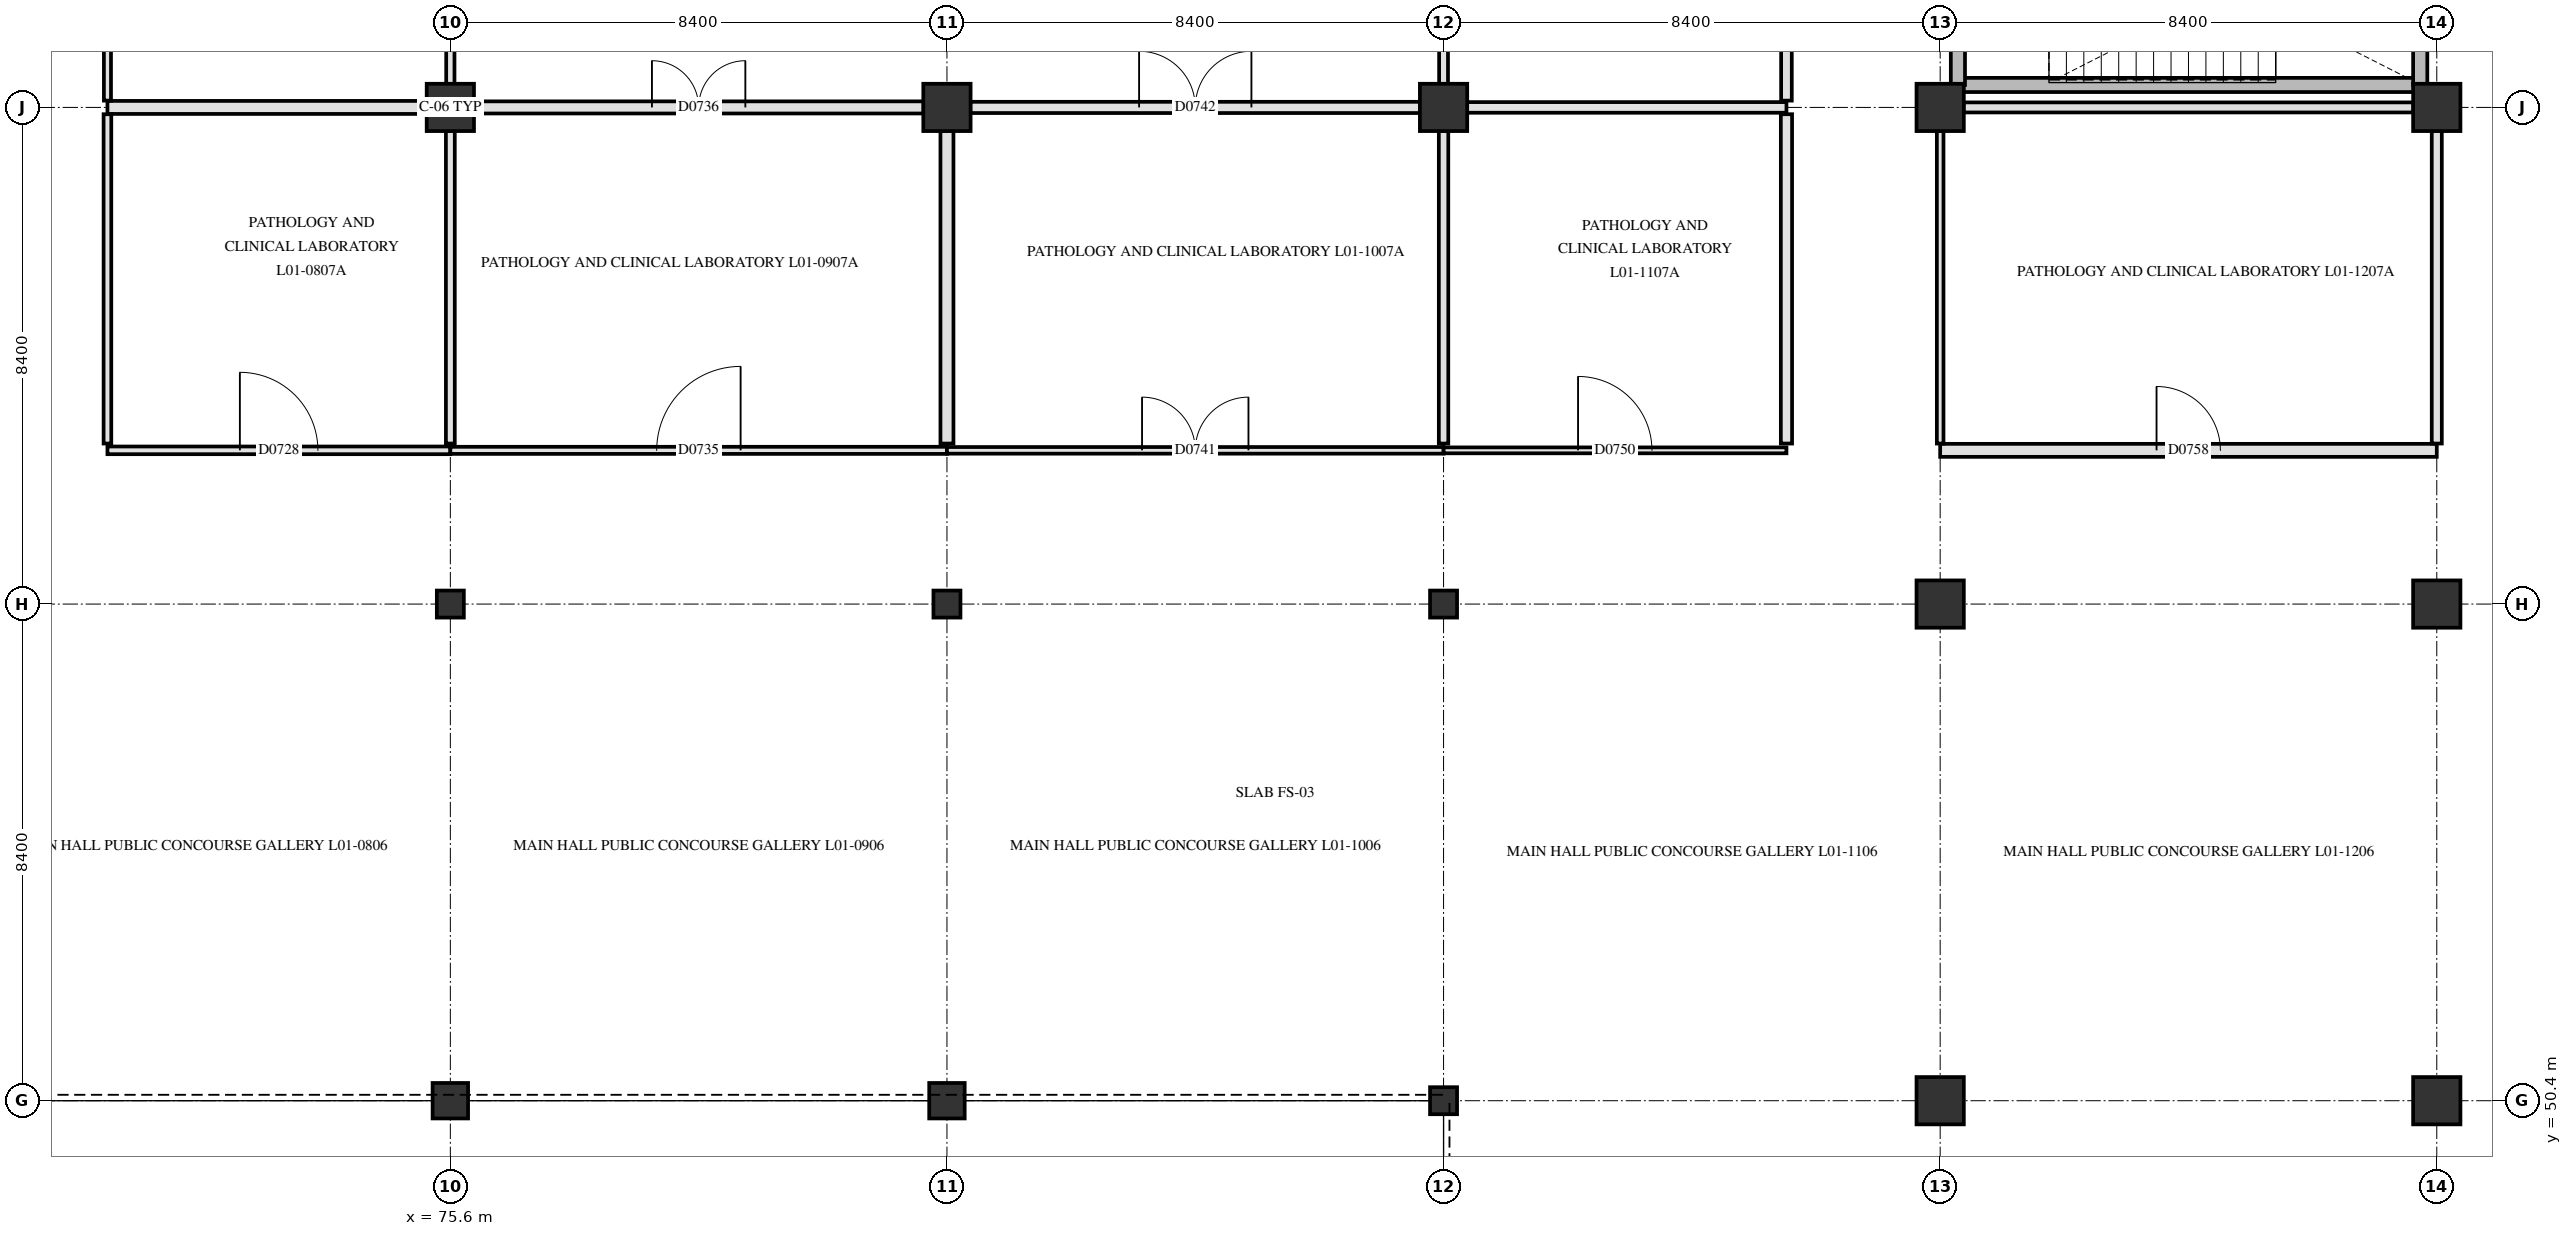
"""IFC4 building model, lengths in metres.
Left out: names, types, materials, properties, quantities, classifications, styles, units other than length and angle.
Written with IfcOpenShell. Run it as: python <this file> out.ifc"""

import sys

from ifc_helpers import new_model, si_unit, direction, frame, frame_2d, origin, origin_2d, place, context, subcontext, project, spatial, rectangle, circle, hollow_circle, extrude, element, fill, save


model = new_model("IFC4")
c1 = context("Model", 3, precision=1e-05, world=origin(), true_north=direction((0.0, 1.0)))
c2 = subcontext(c1, "Body", "Model", "MODEL_VIEW")
j1 = project(units=[si_unit("LENGTHUNIT", "METRE"), si_unit("PLANEANGLEUNIT", "RADIAN")], contexts=[c1])
p1 = place(None, origin())
s1 = spatial("IfcSite", under=j1, at=p1, CompositionType="ELEMENT")
p2 = place(p1, origin())
s2 = spatial("IfcBuilding", under=s1, at=p2, CompositionType="ELEMENT")
p3 = place(p2, frame((0.0, 0.0, 4.8)))
s3 = spatial("IfcBuildingStorey", under=s2, at=p3, CompositionType="ELEMENT", Elevation=4.8)
p4 = place(p3, frame((75.6, 50.4, 0.0), z_axis=(0.0, 0.0, 1.0), x_axis=(1.0, 0.0, 0.0)))
e1 = element("IfcColumn", 1, at=p4, inside=s3, PredefinedType="COLUMN", context=c2, shape_type="SweptSolid", body=[
    extrude(rectangle(XDim=0.6, YDim=0.6, at=origin_2d()), origin(), (0.0, 0.0, 1.0), 4.5),
])
p5 = place(p3, frame((75.6, 58.8, 0.0), z_axis=(0.0, 0.0, 1.0), x_axis=(1.0, 0.0, 0.0)))
e2 = element("IfcColumn", 2, at=p5, inside=s3, PredefinedType="COLUMN", context=c2, shape_type="SweptSolid", body=[
    extrude(hollow_circle(Radius=0.229, WallThickness=0.02, at=origin_2d()), origin(), (0.0, 0.0, 1.0), 4.5),
])
p6 = place(p3, frame((75.6, 67.2, 0.0), z_axis=(0.0, 0.0, 1.0), x_axis=(1.0, 0.0, 0.0)))
e3 = element("IfcColumn", 3, at=p6, inside=s3, PredefinedType="COLUMN", context=c2, shape_type="SweptSolid", body=[
    extrude(circle(Radius=0.4, at=origin_2d()), origin(), (0.0, 0.0, 1.0), 4.5),
])
p7 = place(p3, frame((84.0, 50.4, 0.0), z_axis=(0.0, 0.0, 1.0), x_axis=(1.0, 0.0, 0.0)))
e4 = element("IfcColumn", 4, at=p7, inside=s3, PredefinedType="COLUMN", context=c2, shape_type="SweptSolid", body=[
    extrude(rectangle(XDim=0.6, YDim=0.6, at=origin_2d()), origin(), (0.0, 0.0, 1.0), 4.5),
])
p8 = place(p3, frame((84.0, 58.8, 0.0), z_axis=(0.0, 0.0, 1.0), x_axis=(1.0, 0.0, 0.0)))
e5 = element("IfcColumn", 5, at=p8, inside=s3, PredefinedType="COLUMN", context=c2, shape_type="SweptSolid", body=[
    extrude(hollow_circle(Radius=0.229, WallThickness=0.02, at=origin_2d()), origin(), (0.0, 0.0, 1.0), 4.5),
])
p9 = place(p3, frame((84.0, 67.2, 0.0), z_axis=(0.0, 0.0, 1.0), x_axis=(1.0, 0.0, 0.0)))
e6 = element("IfcColumn", 6, at=p9, inside=s3, PredefinedType="COLUMN", context=c2, shape_type="SweptSolid", body=[
    extrude(circle(Radius=0.4, at=origin_2d()), origin(), (0.0, 0.0, 1.0), 4.5),
])
for number, where, z_axis, x_axis in (
    (7, (92.4, 50.4, 0.0), (0.0, 0.0, 1.0), (1.0, 0.0, 0.0)),
    (8, (92.4, 58.8, 0.0), (0.0, 0.0, 1.0), (1.0, 0.0, 0.0)),
):
    element("IfcColumn", number, at=place(p3, frame(where, z_axis=z_axis, x_axis=x_axis)), inside=s3, PredefinedType="COLUMN", context=c2, shape_type="SweptSolid", body=[
        extrude(hollow_circle(Radius=0.229, WallThickness=0.02, at=origin_2d()), origin(), (0.0, 0.0, 1.0), 4.5),
    ])
p10 = place(p3, frame((92.4, 67.2, 0.0), z_axis=(0.0, 0.0, 1.0), x_axis=(1.0, 0.0, 0.0)))
e9 = element("IfcColumn", 9, at=p10, inside=s3, PredefinedType="COLUMN", context=c2, shape_type="SweptSolid", body=[
    extrude(circle(Radius=0.4, at=origin_2d()), origin(), (0.0, 0.0, 1.0), 4.5),
])
for number, where, z_axis, x_axis in (
    (10, (100.8, 50.4, 0.0), (0.0, 0.0, 1.0), (1.0, 0.0, 0.0)),
    (11, (100.8, 58.8, 0.0), (0.0, 0.0, 1.0), (1.0, 0.0, 0.0)),
    (12, (100.8, 67.2, 0.0), (0.0, 0.0, 1.0), (1.0, 0.0, 0.0)),
    (13, (109.2, 50.4, 0.0), (0.0, 0.0, 1.0), (1.0, 0.0, 0.0)),
):
    element("IfcColumn", number, at=place(p3, frame(where, z_axis=z_axis, x_axis=x_axis)), inside=s3, PredefinedType="COLUMN", context=c2, shape_type="SweptSolid", body=[
        extrude(rectangle(XDim=0.8, YDim=0.8, at=origin_2d()), origin(), (0.0, 0.0, 1.0), 4.5),
    ])
for number, where, z_axis, x_axis in (
    (14, (109.2, 58.8, 0.0), (0.0, 0.0, 1.0), (1.0, 0.0, 0.0)),
    (15, (109.2, 67.2, 0.0), (0.0, 0.0, 1.0), (1.0, 0.0, 0.0)),
):
    element("IfcColumn", number, at=place(p3, frame(where, z_axis=z_axis, x_axis=x_axis)), inside=s3, PredefinedType="COLUMN", context=c2, shape_type="SweptSolid", body=[
        extrude(circle(Radius=0.4, at=origin_2d()), origin(), (0.0, 0.0, 1.0), 4.5),
    ])
p11 = place(p3, frame((101.1, 67.58, 0.0), z_axis=(0.0, 0.0, 1.0), x_axis=(1.0, 0.0, 0.0)))
e16 = element("IfcWall", 16, at=p11, inside=s3, PredefinedType="SHEAR", context=c2, shape_type="SweptSolid", body=[
    extrude(rectangle(XDim=7.82, YDim=0.24, at=frame_2d((3.91, 0.0))), origin(), (0.0, 0.0, 1.0), 4.15),
])
for number, where, z_axis, x_axis in (
    (17, (101.1, 67.58, 0.0), (0.0, 0.0, 1.0), (0.0, 1.0, 0.0)),
    (18, (108.92, 67.58, 0.0), (0.0, 0.0, 1.0), (0.0, 1.0, 0.0)),
):
    element("IfcWall", number, at=place(p3, frame(where, z_axis=z_axis, x_axis=x_axis)), inside=s3, PredefinedType="SHEAR", context=c2, shape_type="SweptSolid", body=[
        extrude(rectangle(XDim=3.32, YDim=0.24, at=frame_2d((1.66, 0.0))), origin(), (0.0, 0.0, 1.0), 4.15),
    ])
p12 = place(p3, frame((69.8, 61.4, 0.0), z_axis=(0.0, 0.0, 1.0), x_axis=(1.0, 0.0, 0.0)))
e19 = element("IfcWall", 19, at=p12, inside=s3, PredefinedType="PARTITIONING", context=c2, shape_type="SweptSolid", body=[
    extrude(rectangle(XDim=5.8, YDim=0.13, at=frame_2d((2.9, 0.0))), origin(), (0.0, 0.0, 1.0), 3.59),
])
p13 = place(p12, frame((2.24, 0.0, 0.0)))
e20 = element("IfcOpeningElement", 20, at=p13, cuts=e19, PredefinedType="OPENING", context=c2, shape_type="SweptSolid", body=[
    extrude(rectangle(XDim=1.32, YDim=2.18, at=frame_2d((0.66, 1.09))), frame((0.0, 0.075, 0.0), z_axis=(0.0, -1.0, 0.0), x_axis=(1.0, 0.0, 0.0)), (0.0, 0.0, 1.0), 0.15),
])
p14 = place(p3, frame((75.6, 61.4, 0.0), z_axis=(0.0, 0.0, 1.0), x_axis=(1.0, 0.0, 0.0)))
e21 = element("IfcWall", 21, at=p14, inside=s3, PredefinedType="PARTITIONING", context=c2, shape_type="SweptSolid", body=[
    extrude(rectangle(XDim=8.4, YDim=0.12, at=frame_2d((4.2, 0.0))), origin(), (0.0, 0.0, 1.0), 3.59),
])
p15 = place(p14, frame((3.49, 0.0, 0.0)))
e22 = element("IfcOpeningElement", 22, at=p15, cuts=e21, PredefinedType="OPENING", context=c2, shape_type="SweptSolid", body=[
    extrude(rectangle(XDim=1.42, YDim=2.22, at=frame_2d((0.71, 1.11))), frame((0.0, 0.07, 0.0), z_axis=(0.0, -1.0, 0.0), x_axis=(1.0, 0.0, 0.0)), (0.0, 0.0, 1.0), 0.14),
])
p16 = place(p3, frame((84.0, 61.4, 0.0), z_axis=(0.0, 0.0, 1.0), x_axis=(1.0, 0.0, 0.0)))
e23 = element("IfcWall", 23, at=p16, inside=s3, PredefinedType="PARTITIONING", context=c2, shape_type="SweptSolid", body=[
    extrude(rectangle(XDim=8.4, YDim=0.112, at=frame_2d((4.2, 0.0))), origin(), (0.0, 0.0, 1.0), 3.59),
])
p17 = place(p16, frame((3.3, 0.0, 0.0)))
e24 = element("IfcOpeningElement", 24, at=p17, cuts=e23, PredefinedType="OPENING", context=c2, shape_type="SweptSolid", body=[
    extrude(rectangle(XDim=1.8, YDim=2.25, at=frame_2d((0.9, 1.125))), frame((0.0, 0.066, 0.0), z_axis=(0.0, -1.0, 0.0), x_axis=(1.0, 0.0, 0.0)), (0.0, 0.0, 1.0), 0.132),
])
p18 = place(p3, frame((92.4, 61.4, 0.0), z_axis=(0.0, 0.0, 1.0), x_axis=(1.0, 0.0, 0.0)))
e25 = element("IfcWall", 25, at=p18, inside=s3, PredefinedType="PARTITIONING", context=c2, shape_type="SweptSolid", body=[
    extrude(rectangle(XDim=5.8, YDim=0.1, at=frame_2d((2.9, 0.0))), origin(), (0.0, 0.0, 1.0), 3.59),
])
p19 = place(p18, frame((2.275, 0.0, 0.0)))
e26 = element("IfcOpeningElement", 26, at=p19, cuts=e25, PredefinedType="OPENING", context=c2, shape_type="SweptSolid", body=[
    extrude(rectangle(XDim=1.25, YDim=2.2, at=frame_2d((0.625, 1.1))), frame((0.0, 0.06, 0.0), z_axis=(0.0, -1.0, 0.0), x_axis=(1.0, 0.0, 0.0)), (0.0, 0.0, 1.0), 0.12),
])
p20 = place(p3, frame((100.8, 61.4, 0.0), z_axis=(0.0, 0.0, 1.0), x_axis=(1.0, 0.0, 0.0)))
e27 = element("IfcWall", 27, at=p20, inside=s3, PredefinedType="PARTITIONING", context=c2, shape_type="SweptSolid", body=[
    extrude(rectangle(XDim=8.4, YDim=0.22, at=frame_2d((4.2, 0.0))), origin(), (0.0, 0.0, 1.0), 3.59),
])
p21 = place(p20, frame((3.66, 0.0, 0.0)))
e28 = element("IfcOpeningElement", 28, at=p21, cuts=e27, PredefinedType="OPENING", context=c2, shape_type="SweptSolid", body=[
    extrude(rectangle(XDim=1.08, YDim=2.12, at=frame_2d((0.54, 1.06))), frame((0.0, 0.12, 0.0), z_axis=(0.0, -1.0, 0.0), x_axis=(1.0, 0.0, 0.0)), (0.0, 0.0, 1.0), 0.24),
])
p22 = place(p3, frame((69.8, 67.2, 0.0), z_axis=(0.0, 0.0, 1.0), x_axis=(1.0, 0.0, 0.0)))
e29 = element("IfcWall", 29, at=p22, inside=s3, PredefinedType="PARTITIONING", context=c2, shape_type="SweptSolid", body=[
    extrude(rectangle(XDim=5.405, YDim=0.22, at=frame_2d((2.703, 0.0))), origin(), (0.0, 0.0, 1.0), 3.54),
])
p23 = place(p3, frame((75.995, 67.2, 0.0), z_axis=(0.0, 0.0, 1.0), x_axis=(1.0, 0.0, 0.0)))
e30 = element("IfcWall", 30, at=p23, inside=s3, PredefinedType="PARTITIONING", context=c2, shape_type="SweptSolid", body=[
    extrude(rectangle(XDim=7.61, YDim=0.205, at=frame_2d((3.805, 0.0))), origin(), (0.0, 0.0, 1.0), 3.54),
])
p24 = place(p23, frame((3.015, 0.0, 0.0)))
e31 = element("IfcOpeningElement", 31, at=p24, cuts=e30, PredefinedType="OPENING", context=c2, shape_type="SweptSolid", body=[
    extrude(rectangle(XDim=1.58, YDim=2.22, at=frame_2d((0.79, 1.11))), frame((0.0, 0.113, 0.0), z_axis=(0.0, -1.0, 0.0), x_axis=(1.0, 0.0, 0.0)), (0.0, 0.0, 1.0), 0.225),
])
p25 = place(p3, frame((84.395, 67.2, 0.0), z_axis=(0.0, 0.0, 1.0), x_axis=(1.0, 0.0, 0.0)))
e32 = element("IfcWall", 32, at=p25, inside=s3, PredefinedType="PARTITIONING", context=c2, shape_type="SweptSolid", body=[
    extrude(rectangle(XDim=7.61, YDim=0.19, at=frame_2d((3.805, 0.0))), origin(), (0.0, 0.0, 1.0), 3.54),
])
p26 = place(p25, frame((2.855, 0.0, 0.0)))
e33 = element("IfcOpeningElement", 33, at=p26, cuts=e32, PredefinedType="OPENING", context=c2, shape_type="SweptSolid", body=[
    extrude(rectangle(XDim=1.9, YDim=2.3, at=frame_2d((0.95, 1.15))), frame((0.0, 0.105, 0.0), z_axis=(0.0, -1.0, 0.0), x_axis=(1.0, 0.0, 0.0)), (0.0, 0.0, 1.0), 0.21),
])
p27 = place(p3, frame((92.795, 67.2, 0.0), z_axis=(0.0, 0.0, 1.0), x_axis=(1.0, 0.0, 0.0)))
e34 = element("IfcWall", 34, at=p27, inside=s3, PredefinedType="PARTITIONING", context=c2, shape_type="SweptSolid", body=[
    extrude(rectangle(XDim=5.405, YDim=0.18, at=frame_2d((2.703, 0.0))), origin(), (0.0, 0.0, 1.0), 3.54),
])
p28 = place(p3, frame((101.195, 67.2, 0.0), z_axis=(0.0, 0.0, 1.0), x_axis=(1.0, 0.0, 0.0)))
e35 = element("IfcWall", 35, at=p28, inside=s3, PredefinedType="PARTITIONING", context=c2, shape_type="SweptSolid", body=[
    extrude(rectangle(XDim=7.61, YDim=0.17, at=frame_2d((3.805, 0.0))), origin(), (0.0, 0.0, 1.0), 3.54),
])
p29 = place(p3, frame((69.8, 61.515, 0.0), z_axis=(0.0, 0.0, 1.0), x_axis=(0.0, 1.0, 0.0)))
e36 = element("IfcWall", 36, at=p29, inside=s3, PredefinedType="PARTITIONING", context=c2, shape_type="SweptSolid", body=[
    extrude(rectangle(XDim=5.57, YDim=0.13, at=frame_2d((2.785, 0.0))), origin(), (0.0, 0.0, 1.0), 3.54),
])
p30 = place(p3, frame((69.8, 67.315, 0.0), z_axis=(0.0, 0.0, 1.0), x_axis=(0.0, 1.0, 0.0)))
e37 = element("IfcWall", 37, at=p30, inside=s3, PredefinedType="PARTITIONING", context=c2, shape_type="SweptSolid", body=[
    extrude(rectangle(XDim=8.17, YDim=0.12, at=frame_2d((4.085, 0.0))), origin(), (0.0, 0.0, 1.0), 3.54),
])
p31 = place(p3, frame((75.6, 61.515, 0.0), z_axis=(0.0, 0.0, 1.0), x_axis=(0.0, 1.0, 0.0)))
e38 = element("IfcWall", 38, at=p31, inside=s3, PredefinedType="PARTITIONING", context=c2, shape_type="SweptSolid", body=[
    extrude(rectangle(XDim=5.29, YDim=0.15, at=frame_2d((2.645, 0.0))), origin(), (0.0, 0.0, 1.0), 3.59),
])
p32 = place(p3, frame((75.6, 67.595, 0.0), z_axis=(0.0, 0.0, 1.0), x_axis=(0.0, 1.0, 0.0)))
e39 = element("IfcWall", 39, at=p32, inside=s3, PredefinedType="PARTITIONING", context=c2, shape_type="SweptSolid", body=[
    extrude(rectangle(XDim=7.61, YDim=0.14, at=frame_2d((3.805, 0.0))), origin(), (0.0, 0.0, 1.0), 3.59),
])
p33 = place(p3, frame((84.0, 61.515, 0.0), z_axis=(0.0, 0.0, 1.0), x_axis=(0.0, 1.0, 0.0)))
e40 = element("IfcWall", 40, at=p33, inside=s3, PredefinedType="PARTITIONING", context=c2, shape_type="SweptSolid", body=[
    extrude(rectangle(XDim=5.29, YDim=0.22, at=frame_2d((2.645, 0.0))), origin(), (0.0, 0.0, 1.0), 3.59),
])
p34 = place(p3, frame((92.4, 61.515, 0.0), z_axis=(0.0, 0.0, 1.0), x_axis=(0.0, 1.0, 0.0)))
e41 = element("IfcWall", 41, at=p34, inside=s3, PredefinedType="PARTITIONING", context=c2, shape_type="SweptSolid", body=[
    extrude(rectangle(XDim=5.29, YDim=0.16, at=frame_2d((2.645, 0.0))), origin(), (0.0, 0.0, 1.0), 3.59),
])
p35 = place(p3, frame((92.4, 67.595, 0.0), z_axis=(0.0, 0.0, 1.0), x_axis=(0.0, 1.0, 0.0)))
e42 = element("IfcWall", 42, at=p35, inside=s3, PredefinedType="PARTITIONING", context=c2, shape_type="SweptSolid", body=[
    extrude(rectangle(XDim=7.61, YDim=0.15, at=frame_2d((3.805, 0.0))), origin(), (0.0, 0.0, 1.0), 3.59),
])
p36 = place(p3, frame((98.2, 61.515, 0.0), z_axis=(0.0, 0.0, 1.0), x_axis=(0.0, 1.0, 0.0)))
e43 = element("IfcWall", 43, at=p36, inside=s3, PredefinedType="PARTITIONING", context=c2, shape_type="SweptSolid", body=[
    extrude(rectangle(XDim=5.57, YDim=0.19, at=frame_2d((2.785, 0.0))), origin(), (0.0, 0.0, 1.0), 3.54),
])
p37 = place(p3, frame((98.2, 67.315, 0.0), z_axis=(0.0, 0.0, 1.0), x_axis=(0.0, 1.0, 0.0)))
e44 = element("IfcWall", 44, at=p37, inside=s3, PredefinedType="PARTITIONING", context=c2, shape_type="SweptSolid", body=[
    extrude(rectangle(XDim=8.17, YDim=0.18, at=frame_2d((4.085, 0.0))), origin(), (0.0, 0.0, 1.0), 3.54),
])
p38 = place(p3, frame((100.8, 61.515, 0.0), z_axis=(0.0, 0.0, 1.0), x_axis=(0.0, 1.0, 0.0)))
e45 = element("IfcWall", 45, at=p38, inside=s3, PredefinedType="PARTITIONING", context=c2, shape_type="SweptSolid", body=[
    extrude(rectangle(XDim=5.29, YDim=0.112, at=frame_2d((2.645, 0.0))), origin(), (0.0, 0.0, 1.0), 3.59),
])
p39 = place(p3, frame((109.2, 61.515, 0.0), z_axis=(0.0, 0.0, 1.0), x_axis=(0.0, 1.0, 0.0)))
e46 = element("IfcWall", 46, at=p39, inside=s3, PredefinedType="PARTITIONING", context=c2, shape_type="SweptSolid", body=[
    extrude(rectangle(XDim=5.29, YDim=0.17, at=frame_2d((2.645, 0.0))), origin(), (0.0, 0.0, 1.0), 3.59),
])
p40 = place(p13, origin())
e47 = element("IfcDoor", 47, at=p40, inside=s3, OperationType="SINGLE_SWING_LEFT", PredefinedType="DOOR", context=c2, shape_type="SweptSolid", body=[
    extrude(rectangle(XDim=1.32, YDim=2.18, at=frame_2d((0.66, 1.09))), frame((0.0, 0.025, 0.0), z_axis=(0.0, -1.0, 0.0), x_axis=(1.0, 0.0, 0.0)), (0.0, 0.0, 1.0), 0.05),
])
fill(e20, e47)
p41 = place(p15, origin())
e48 = element("IfcDoor", 48, at=p41, inside=s3, OperationType="SINGLE_SWING_RIGHT", PredefinedType="DOOR", context=c2, shape_type="SweptSolid", body=[
    extrude(rectangle(XDim=1.42, YDim=2.22, at=frame_2d((0.71, 1.11))), frame((0.0, 0.025, 0.0), z_axis=(0.0, -1.0, 0.0), x_axis=(1.0, 0.0, 0.0)), (0.0, 0.0, 1.0), 0.05),
])
fill(e22, e48)
p42 = place(p24, origin())
e49 = element("IfcDoor", 49, at=p42, inside=s3, OperationType="DOUBLE_SWING_LEFT", PredefinedType="DOOR", context=c2, shape_type="SweptSolid", body=[
    extrude(rectangle(XDim=1.58, YDim=2.22, at=frame_2d((0.79, 1.11))), frame((0.0, 0.025, 0.0), z_axis=(0.0, -1.0, 0.0), x_axis=(1.0, 0.0, 0.0)), (0.0, 0.0, 1.0), 0.05),
])
fill(e31, e49)
p43 = place(p17, origin())
e50 = element("IfcDoor", 50, at=p43, inside=s3, OperationType="DOUBLE_SWING_RIGHT", PredefinedType="DOOR", context=c2, shape_type="SweptSolid", body=[
    extrude(rectangle(XDim=1.8, YDim=2.25, at=frame_2d((0.9, 1.125))), frame((0.0, 0.025, 0.0), z_axis=(0.0, -1.0, 0.0), x_axis=(1.0, 0.0, 0.0)), (0.0, 0.0, 1.0), 0.05),
])
fill(e24, e50)
p44 = place(p26, origin())
e51 = element("IfcDoor", 51, at=p44, inside=s3, OperationType="DOUBLE_SWING_LEFT", PredefinedType="DOOR", context=c2, shape_type="SweptSolid", body=[
    extrude(rectangle(XDim=1.9, YDim=2.3, at=frame_2d((0.95, 1.15))), frame((0.0, 0.025, 0.0), z_axis=(0.0, -1.0, 0.0), x_axis=(1.0, 0.0, 0.0)), (0.0, 0.0, 1.0), 0.05),
])
fill(e33, e51)
p45 = place(p19, origin())
e52 = element("IfcDoor", 52, at=p45, inside=s3, OperationType="SINGLE_SWING_LEFT", PredefinedType="DOOR", context=c2, shape_type="SweptSolid", body=[
    extrude(rectangle(XDim=1.25, YDim=2.2, at=frame_2d((0.625, 1.1))), frame((0.0, 0.025, 0.0), z_axis=(0.0, -1.0, 0.0), x_axis=(1.0, 0.0, 0.0)), (0.0, 0.0, 1.0), 0.05),
])
fill(e26, e52)
p46 = place(p21, origin())
e53 = element("IfcDoor", 53, at=p46, inside=s3, OperationType="SINGLE_SWING_LEFT", PredefinedType="DOOR", context=c2, shape_type="SweptSolid", body=[
    extrude(rectangle(XDim=1.08, YDim=2.12, at=frame_2d((0.54, 1.06))), frame((0.0, 0.025, 0.0), z_axis=(0.0, -1.0, 0.0), x_axis=(1.0, 0.0, 0.0)), (0.0, 0.0, 1.0), 0.05),
])
fill(e28, e53)
save(model, sys.argv[1])
